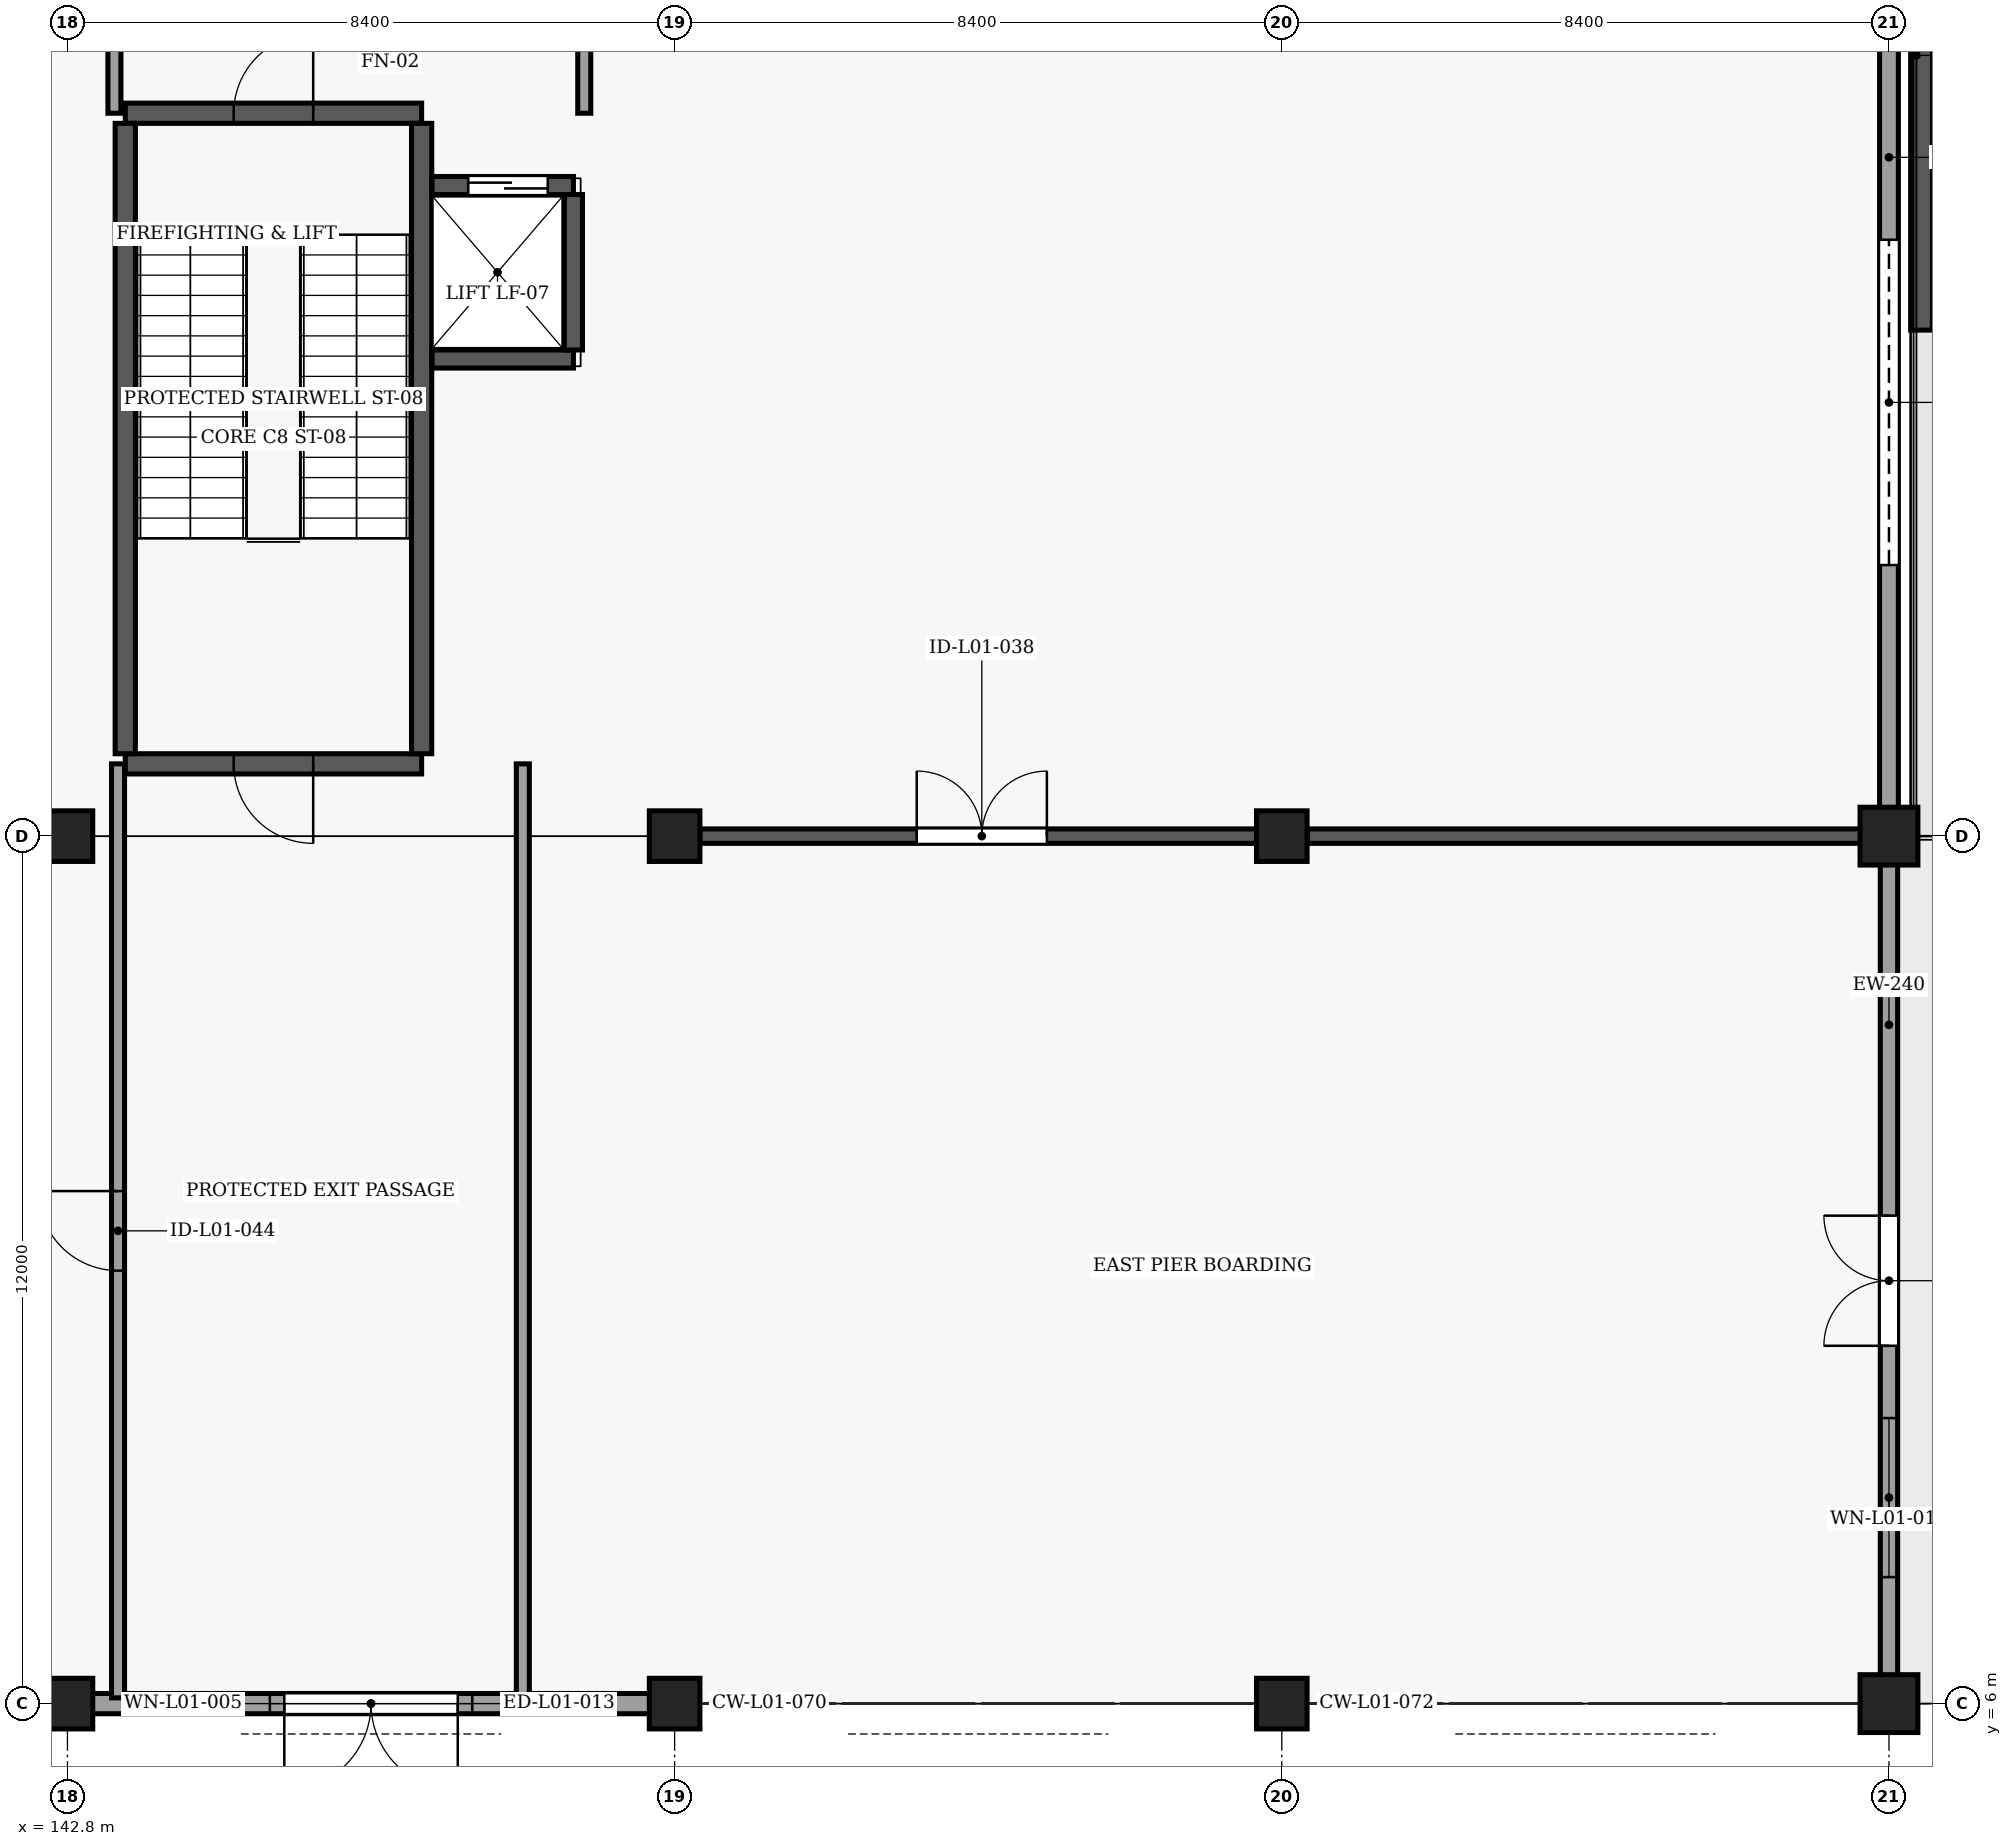
"""IFC4 building model, lengths in metres.
Left out: names, types, materials, properties, quantities, classifications, styles, units other than length and angle.
Written with IfcOpenShell. Run it as: python <this file> out.ifc"""

import sys

from ifc_helpers import new_model, si_unit, direction, frame, frame_2d, origin, origin_2d, place, context, subcontext, project, spatial, rectangle, extrude, element, fill, save


model = new_model("IFC4")
c1 = context("Model", 3, precision=1e-05, world=origin(), true_north=direction((0.0, 1.0)))
c2 = subcontext(c1, "Body", "Model", "MODEL_VIEW")
j1 = project(units=[si_unit("LENGTHUNIT", "METRE"), si_unit("PLANEANGLEUNIT", "RADIAN")], contexts=[c1])
p1 = place(None, origin())
s1 = spatial("IfcSite", under=j1, at=p1, CompositionType="ELEMENT")
p2 = place(p1, origin())
s2 = spatial("IfcBuilding", under=s1, at=p2, CompositionType="ELEMENT")
p3 = place(p2, origin())
s3 = spatial("IfcBuildingStorey", under=s2, at=p3, CompositionType="ELEMENT", Elevation=0.0)
for number, where, z_axis, x_axis in (
    (1, (142.8, 6.0, -0.45), (0.0, 0.0, 1.0), (1.0, 0.0, 0.0)),
    (2, (151.2, 6.0, -0.45), (0.0, 0.0, 1.0), (1.0, 0.0, 0.0)),
    (3, (159.6, 6.0, -0.45), (0.0, 0.0, 1.0), (1.0, 0.0, 0.0)),
):
    element("IfcColumn", number, at=place(p3, frame(where, z_axis=z_axis, x_axis=x_axis)), inside=s3, PredefinedType="COLUMN", context=c2, shape_type="SweptSolid", body=[
        extrude(rectangle(XDim=0.7, YDim=0.7, at=origin_2d()), origin(), (0.0, 0.0, 1.0), 5.57),
    ])
p4 = place(p3, frame((168.0, 6.0, -0.45), z_axis=(0.0, 0.0, 1.0), x_axis=(1.0, 0.0, 0.0)))
e4 = element("IfcColumn", 4, at=p4, inside=s3, PredefinedType="COLUMN", context=c2, shape_type="SweptSolid", body=[
    extrude(rectangle(XDim=0.8, YDim=0.8, at=origin_2d()), origin(), (0.0, 0.0, 1.0), 5.57),
])
for number, where, z_axis, x_axis in (
    (5, (142.8, 18.0, -0.45), (0.0, 0.0, 1.0), (1.0, 0.0, 0.0)),
    (6, (151.2, 18.0, -0.45), (0.0, 0.0, 1.0), (1.0, 0.0, 0.0)),
    (7, (159.6, 18.0, -0.45), (0.0, 0.0, 1.0), (1.0, 0.0, 0.0)),
):
    element("IfcColumn", number, at=place(p3, frame(where, z_axis=z_axis, x_axis=x_axis)), inside=s3, PredefinedType="COLUMN", context=c2, shape_type="SweptSolid", body=[
        extrude(rectangle(XDim=0.7, YDim=0.7, at=origin_2d()), origin(), (0.0, 0.0, 1.0), 5.53),
    ])
p5 = place(p3, frame((168.0, 18.0, -0.45), z_axis=(0.0, 0.0, 1.0), x_axis=(1.0, 0.0, 0.0)))
e8 = element("IfcColumn", 8, at=p5, inside=s3, PredefinedType="COLUMN", context=c2, shape_type="SweptSolid", body=[
    extrude(rectangle(XDim=0.8, YDim=0.8, at=origin_2d()), origin(), (0.0, 0.0, 1.0), 5.53),
])
p6 = place(p3, frame((147.7, 19.0, -0.45), z_axis=(0.0, 0.0, 1.0), x_axis=(-1.0, 0.0, 0.0)))
e9 = element("IfcWall", 9, at=p6, inside=s3, PredefinedType="SHEAR", context=c2, shape_type="SweptSolid", body=[
    extrude(rectangle(XDim=4.1, YDim=0.28, at=frame_2d((2.05, 0.0))), origin(), (0.0, 0.0, 1.0), 5.53),
])
p7 = place(p6, frame((1.5, 0.0, 0.45)))
e10 = element("IfcOpeningElement", 10, at=p7, cuts=e9, PredefinedType="OPENING", context=c2, shape_type="SweptSolid", body=[
    extrude(rectangle(XDim=1.1, YDim=2.2, at=frame_2d((0.55, 1.1))), frame((0.0, 0.15, 0.0), z_axis=(0.0, -1.0, 0.0), x_axis=(1.0, 0.0, 0.0)), (0.0, 0.0, 1.0), 0.3),
])
p8 = place(p3, frame((143.6, 28.0, -0.45), z_axis=(0.0, 0.0, 1.0), x_axis=(1.0, 0.0, 0.0)))
e11 = element("IfcWall", 11, at=p8, inside=s3, PredefinedType="SHEAR", context=c2, shape_type="SweptSolid", body=[
    extrude(rectangle(XDim=4.1, YDim=0.28, at=frame_2d((2.05, 0.0))), origin(), (0.0, 0.0, 1.0), 5.53),
])
p9 = place(p8, frame((1.5, 0.0, 0.45)))
e12 = element("IfcOpeningElement", 12, at=p9, cuts=e11, PredefinedType="OPENING", context=c2, shape_type="SweptSolid", body=[
    extrude(rectangle(XDim=1.1, YDim=2.2, at=frame_2d((0.55, 1.1))), frame((0.0, 0.15, 0.0), z_axis=(0.0, -1.0, 0.0), x_axis=(1.0, 0.0, 0.0)), (0.0, 0.0, 1.0), 0.3),
])
for number, where, z_axis, x_axis in (
    (13, (143.6, 19.14, -0.45), (0.0, 0.0, 1.0), (0.0, 1.0, 0.0)),
    (14, (147.7, 19.14, -0.45), (0.0, 0.0, 1.0), (0.0, 1.0, 0.0)),
):
    element("IfcWall", number, at=place(p3, frame(where, z_axis=z_axis, x_axis=x_axis)), inside=s3, PredefinedType="SHEAR", context=c2, shape_type="SweptSolid", body=[
        extrude(rectangle(XDim=8.72, YDim=0.28, at=frame_2d((4.36, 0.0))), origin(), (0.0, 0.0, 1.0), 5.53),
    ])
p10 = place(p3, frame((147.845, 24.6, -1.6), z_axis=(0.0, 0.0, 1.0), x_axis=(1.0, 0.0, 0.0)))
e15 = element("IfcWall", 15, at=p10, inside=s3, PredefinedType="SOLIDWALL", context=c2, shape_type="SweptSolid", body=[
    extrude(rectangle(XDim=1.955, YDim=0.25, at=frame_2d((0.978, 0.0))), origin(), (0.0, 0.0, 1.0), 6.68),
])
p11 = place(p3, frame((147.845, 27.0, -1.6), z_axis=(0.0, 0.0, 1.0), x_axis=(1.0, 0.0, 0.0)))
e16 = element("IfcWall", 16, at=p11, inside=s3, PredefinedType="SOLIDWALL", context=c2, shape_type="SweptSolid", body=[
    extrude(rectangle(XDim=1.955, YDim=0.25, at=frame_2d((0.978, 0.0))), origin(), (0.0, 0.0, 1.0), 6.68),
])
p12 = place(p11, frame((0.5, 0.0, 1.6)))
e17 = element("IfcOpeningElement", 17, at=p12, cuts=e16, PredefinedType="OPENING", context=c2, shape_type="SweptSolid", body=[
    extrude(rectangle(XDim=1.1, YDim=2.2, at=frame_2d((0.55, 1.1))), frame((0.0, 0.135, 0.0), z_axis=(0.0, -1.0, 0.0), x_axis=(1.0, 0.0, 0.0)), (0.0, 0.0, 1.0), 0.27),
])
p13 = place(p3, frame((149.8, 24.725, -1.6), z_axis=(0.0, 0.0, 1.0), x_axis=(0.0, 1.0, 0.0)))
e18 = element("IfcWall", 18, at=p13, inside=s3, PredefinedType="SOLIDWALL", context=c2, shape_type="SweptSolid", body=[
    extrude(rectangle(XDim=2.15, YDim=0.25, at=frame_2d((1.075, 0.0))), origin(), (0.0, 0.0, 1.0), 6.68),
])
p14 = place(p3, frame((168.45, 25.0, 0.0), z_axis=(0.0, 0.0, 1.0), x_axis=(0.0, 1.0, 0.0)))
e19 = element("IfcWall", 19, at=p14, inside=s3, PredefinedType="SHEAR", context=c2, shape_type="SweptSolid", body=[
    extrude(rectangle(XDim=9.0, YDim=0.3, at=frame_2d((4.5, 0.0))), origin(), (0.0, 0.0, 1.0), 0.85),
])
p15 = place(p3, frame((150.865, 6.0, 0.0), z_axis=(0.0, 0.0, 1.0), x_axis=(-1.0, 0.0, 0.0)))
e20 = element("IfcWall", 20, at=p15, inside=s3, PredefinedType="SOLIDWALL", context=c2, shape_type="SweptSolid", body=[
    extrude(rectangle(XDim=7.73, YDim=0.28, at=frame_2d((3.865, 0.0))), origin(), (0.0, 0.0, 1.0), 4.658),
])
p16 = place(p15, frame((2.665, 0.0, 0.0)))
e21 = element("IfcOpeningElement", 21, at=p16, cuts=e20, PredefinedType="OPENING", context=c2, shape_type="SweptSolid", body=[
    extrude(rectangle(XDim=2.4, YDim=2.4, at=frame_2d((1.2, 1.2))), frame((0.0, 0.15, 0.0), z_axis=(0.0, -1.0, 0.0), x_axis=(1.0, 0.0, 0.0)), (0.0, 0.0, 1.0), 0.3),
])
p17 = place(p15, frame((2.465, 0.0, 3.1)))
e22 = element("IfcOpeningElement", 22, at=p17, cuts=e20, PredefinedType="OPENING", context=c2, shape_type="SweptSolid", body=[
    extrude(rectangle(XDim=2.8, YDim=0.95, at=frame_2d((1.4, 0.475))), frame((0.0, 0.15, 0.0), z_axis=(0.0, -1.0, 0.0), x_axis=(1.0, 0.0, 0.0)), (0.0, 0.0, 1.0), 0.3),
])
p18 = place(p3, frame((168.0, 6.35, 0.0), z_axis=(0.0, 0.0, 1.0), x_axis=(0.0, 1.0, 0.0)))
e23 = element("IfcWall", 23, at=p18, inside=s3, PredefinedType="ELEMENTEDWALL", context=c2, shape_type="SweptSolid", body=[
    extrude(rectangle(XDim=11.3, YDim=0.24, at=frame_2d((5.65, 0.0))), origin(), (0.0, 0.0, 1.0), 4.658),
])
p19 = place(p18, frame((4.6, 0.0, 0.0)))
e24 = element("IfcOpeningElement", 24, at=p19, cuts=e23, PredefinedType="OPENING", context=c2, shape_type="SweptSolid", body=[
    extrude(rectangle(XDim=1.8, YDim=2.2, at=frame_2d((0.9, 1.1))), frame((0.0, 0.13, 0.0), z_axis=(0.0, -1.0, 0.0), x_axis=(1.0, 0.0, 0.0)), (0.0, 0.0, 1.0), 0.26),
])
p20 = place(p18, frame((1.4, 0.0, 0.95)))
e25 = element("IfcOpeningElement", 25, at=p20, cuts=e23, PredefinedType="OPENING", context=c2, shape_type="SweptSolid", body=[
    extrude(rectangle(XDim=2.2, YDim=1.7, at=frame_2d((1.1, 0.85))), frame((0.0, 0.13, 0.0), z_axis=(0.0, -1.0, 0.0), x_axis=(1.0, 0.0, 0.0)), (0.0, 0.0, 1.0), 0.26),
])
p21 = place(p3, frame((168.0, 18.35, 0.0), z_axis=(0.0, 0.0, 1.0), x_axis=(0.0, 1.0, 0.0)))
e26 = element("IfcWall", 26, at=p21, inside=s3, PredefinedType="SOLIDWALL", context=c2, shape_type="SweptSolid", body=[
    extrude(rectangle(XDim=11.3, YDim=0.26, at=frame_2d((5.65, 0.0))), origin(), (0.0, 0.0, 1.0), 4.534),
])
p22 = place(p21, frame((3.4, 0.0, 0.0)))
e27 = element("IfcOpeningElement", 27, at=p22, cuts=e26, PredefinedType="OPENING", context=c2, shape_type="SweptSolid", body=[
    extrude(rectangle(XDim=4.5, YDim=3.8, at=frame_2d((2.25, 1.9))), frame((0.0, 0.14, 0.0), z_axis=(0.0, -1.0, 0.0), x_axis=(1.0, 0.0, 0.0)), (0.0, 0.0, 1.0), 0.28),
])
for number, where, z_axis, x_axis in (
    (28, (143.45, 28.0, 0.0), (0.0, 0.0, 1.0), (0.0, 1.0, 0.0)),
    (29, (149.95, 28.0, 0.0), (0.0, 0.0, 1.0), (0.0, 1.0, 0.0)),
):
    element("IfcWall", number, at=place(p3, frame(where, z_axis=z_axis, x_axis=x_axis)), inside=s3, PredefinedType="SOLIDWALL", context=c2, shape_type="SweptSolid", body=[
        extrude(rectangle(XDim=2.51, YDim=0.18, at=frame_2d((1.255, 0.0))), origin(), (0.0, 0.0, 1.0), 4.387),
    ])
p23 = place(p3, frame((151.55, 18.0, 0.0), z_axis=(0.0, 0.0, 1.0), x_axis=(1.0, 0.0, 0.0)))
e30 = element("IfcWall", 30, at=p23, inside=s3, PredefinedType="SOLIDWALL", context=c2, shape_type="SweptSolid", body=[
    extrude(rectangle(XDim=7.7, YDim=0.2, at=frame_2d((3.85, 0.0))), origin(), (0.0, 0.0, 1.0), 5.08),
])
p24 = place(p23, frame((3.0, 0.0, 0.0)))
e31 = element("IfcOpeningElement", 31, at=p24, cuts=e30, PredefinedType="OPENING", context=c2, shape_type="SweptSolid", body=[
    extrude(rectangle(XDim=1.8, YDim=2.2, at=frame_2d((0.9, 1.1))), frame((0.0, 0.11, 0.0), z_axis=(0.0, -1.0, 0.0), x_axis=(1.0, 0.0, 0.0)), (0.0, 0.0, 1.0), 0.22),
])
p25 = place(p3, frame((159.95, 18.0, 0.0), z_axis=(0.0, 0.0, 1.0), x_axis=(1.0, 0.0, 0.0)))
e32 = element("IfcWall", 32, at=p25, inside=s3, PredefinedType="SOLIDWALL", context=c2, shape_type="SweptSolid", body=[
    extrude(rectangle(XDim=7.7, YDim=0.2, at=frame_2d((3.85, 0.0))), origin(), (0.0, 0.0, 1.0), 5.08),
])
p26 = place(p3, frame((143.5, 6.08, 0.0), z_axis=(0.0, 0.0, 1.0), x_axis=(0.0, 1.0, 0.0)))
e33 = element("IfcWall", 33, at=p26, inside=s3, PredefinedType="SOLIDWALL", context=c2, shape_type="SweptSolid", body=[
    extrude(rectangle(XDim=12.92, YDim=0.18, at=frame_2d((6.46, 0.0))), origin(), (0.0, 0.0, 1.0), 4.62),
])
p27 = place(p26, frame((5.91, 0.0, 0.0)))
e34 = element("IfcOpeningElement", 34, at=p27, cuts=e33, PredefinedType="OPENING", context=c2, shape_type="SweptSolid", body=[
    extrude(rectangle(XDim=1.1, YDim=2.2, at=frame_2d((0.55, 1.1))), frame((0.0, 0.1, 0.0), z_axis=(0.0, -1.0, 0.0), x_axis=(1.0, 0.0, 0.0)), (0.0, 0.0, 1.0), 0.2),
])
p28 = place(p3, frame((149.1, 6.08, 0.0), z_axis=(0.0, 0.0, 1.0), x_axis=(0.0, 1.0, 0.0)))
e35 = element("IfcWall", 35, at=p28, inside=s3, PredefinedType="SOLIDWALL", context=c2, shape_type="SweptSolid", body=[
    extrude(rectangle(XDim=12.92, YDim=0.18, at=frame_2d((6.46, 0.0))), origin(), (0.0, 0.0, 1.0), 4.62),
])
p29 = place(p9, origin())
e36 = element("IfcDoor", 36, at=p29, inside=s3, OperationType="SINGLE_SWING_RIGHT", PredefinedType="DOOR", context=c2, shape_type="SweptSolid", body=[
    extrude(rectangle(XDim=1.1, YDim=2.2, at=frame_2d((0.55, 1.1))), frame((0.0, 0.025, 0.0), z_axis=(0.0, -1.0, 0.0), x_axis=(1.0, 0.0, 0.0)), (0.0, 0.0, 1.0), 0.05),
])
fill(e12, e36)
p30 = place(p7, origin())
e37 = element("IfcDoor", 37, at=p30, inside=s3, OperationType="SINGLE_SWING_LEFT", PredefinedType="DOOR", context=c2, shape_type="SweptSolid", body=[
    extrude(rectangle(XDim=1.1, YDim=2.2, at=frame_2d((0.55, 1.1))), frame((0.0, 0.025, 0.0), z_axis=(0.0, -1.0, 0.0), x_axis=(1.0, 0.0, 0.0)), (0.0, 0.0, 1.0), 0.05),
])
fill(e10, e37)
p31 = place(p12, origin())
e38 = element("IfcDoor", 38, at=p31, inside=s3, OperationType="SLIDING_TO_LEFT", PredefinedType="DOOR", context=c2, shape_type="SweptSolid", body=[
    extrude(rectangle(XDim=1.1, YDim=2.2, at=frame_2d((0.55, 1.1))), frame((0.0, 0.025, 0.0), z_axis=(0.0, -1.0, 0.0), x_axis=(1.0, 0.0, 0.0)), (0.0, 0.0, 1.0), 0.05),
])
fill(e17, e38)
p32 = place(p16, origin())
e39 = element("IfcDoor", 39, at=p32, inside=s3, OperationType="DOUBLE_DOOR_SINGLE_SWING", PredefinedType="DOOR", context=c2, shape_type="SweptSolid", body=[
    extrude(rectangle(XDim=2.4, YDim=2.4, at=frame_2d((1.2, 1.2))), frame((0.0, 0.025, 0.0), z_axis=(0.0, -1.0, 0.0), x_axis=(1.0, 0.0, 0.0)), (0.0, 0.0, 1.0), 0.05),
])
fill(e21, e39)
p33 = place(p17, origin())
e40 = element("IfcWindow", 40, at=p33, inside=s3, PartitioningType="SINGLE_PANEL", PredefinedType="WINDOW", context=c2, shape_type="SweptSolid", body=[
    extrude(rectangle(XDim=2.8, YDim=0.95, at=frame_2d((1.4, 0.475))), frame((0.0, 0.03, 0.0), z_axis=(0.0, -1.0, 0.0), x_axis=(1.0, 0.0, 0.0)), (0.0, 0.0, 1.0), 0.06),
])
fill(e22, e40)
p34 = place(p19, origin())
e41 = element("IfcDoor", 41, at=p34, inside=s3, OperationType="DOUBLE_DOOR_SINGLE_SWING", PredefinedType="DOOR", context=c2, shape_type="SweptSolid", body=[
    extrude(rectangle(XDim=1.8, YDim=2.2, at=frame_2d((0.9, 1.1))), frame((0.0, 0.025, 0.0), z_axis=(0.0, -1.0, 0.0), x_axis=(1.0, 0.0, 0.0)), (0.0, 0.0, 1.0), 0.05),
])
fill(e24, e41)
p35 = place(p20, origin())
e42 = element("IfcWindow", 42, at=p35, inside=s3, PartitioningType="SINGLE_PANEL", PredefinedType="WINDOW", context=c2, shape_type="SweptSolid", body=[
    extrude(rectangle(XDim=2.2, YDim=1.7, at=frame_2d((1.1, 0.85))), frame((0.0, 0.03, 0.0), z_axis=(0.0, -1.0, 0.0), x_axis=(1.0, 0.0, 0.0)), (0.0, 0.0, 1.0), 0.06),
])
fill(e25, e42)
p36 = place(p22, origin())
e43 = element("IfcDoor", 43, at=p36, inside=s3, OperationType="ROLLINGUP", PredefinedType="GATE", context=c2, shape_type="SweptSolid", body=[
    extrude(rectangle(XDim=4.5, YDim=3.8, at=frame_2d((2.25, 1.9))), frame((0.0, 0.025, 0.0), z_axis=(0.0, -1.0, 0.0), x_axis=(1.0, 0.0, 0.0)), (0.0, 0.0, 1.0), 0.05),
])
fill(e27, e43)
p37 = place(p24, origin())
e44 = element("IfcDoor", 44, at=p37, inside=s3, OperationType="DOUBLE_DOOR_SINGLE_SWING", PredefinedType="DOOR", context=c2, shape_type="SweptSolid", body=[
    extrude(rectangle(XDim=1.8, YDim=2.2, at=frame_2d((0.9, 1.1))), frame((0.0, 0.025, 0.0), z_axis=(0.0, -1.0, 0.0), x_axis=(1.0, 0.0, 0.0)), (0.0, 0.0, 1.0), 0.05),
])
fill(e31, e44)
p38 = place(p27, origin())
e45 = element("IfcDoor", 45, at=p38, inside=s3, OperationType="SINGLE_SWING_RIGHT", PredefinedType="DOOR", context=c2, shape_type="SweptSolid", body=[
    extrude(rectangle(XDim=1.1, YDim=2.2, at=frame_2d((0.55, 1.1))), frame((0.0, 0.025, 0.0), z_axis=(0.0, -1.0, 0.0), x_axis=(1.0, 0.0, 0.0)), (0.0, 0.0, 1.0), 0.05),
])
fill(e34, e45)
save(model, sys.argv[1])
